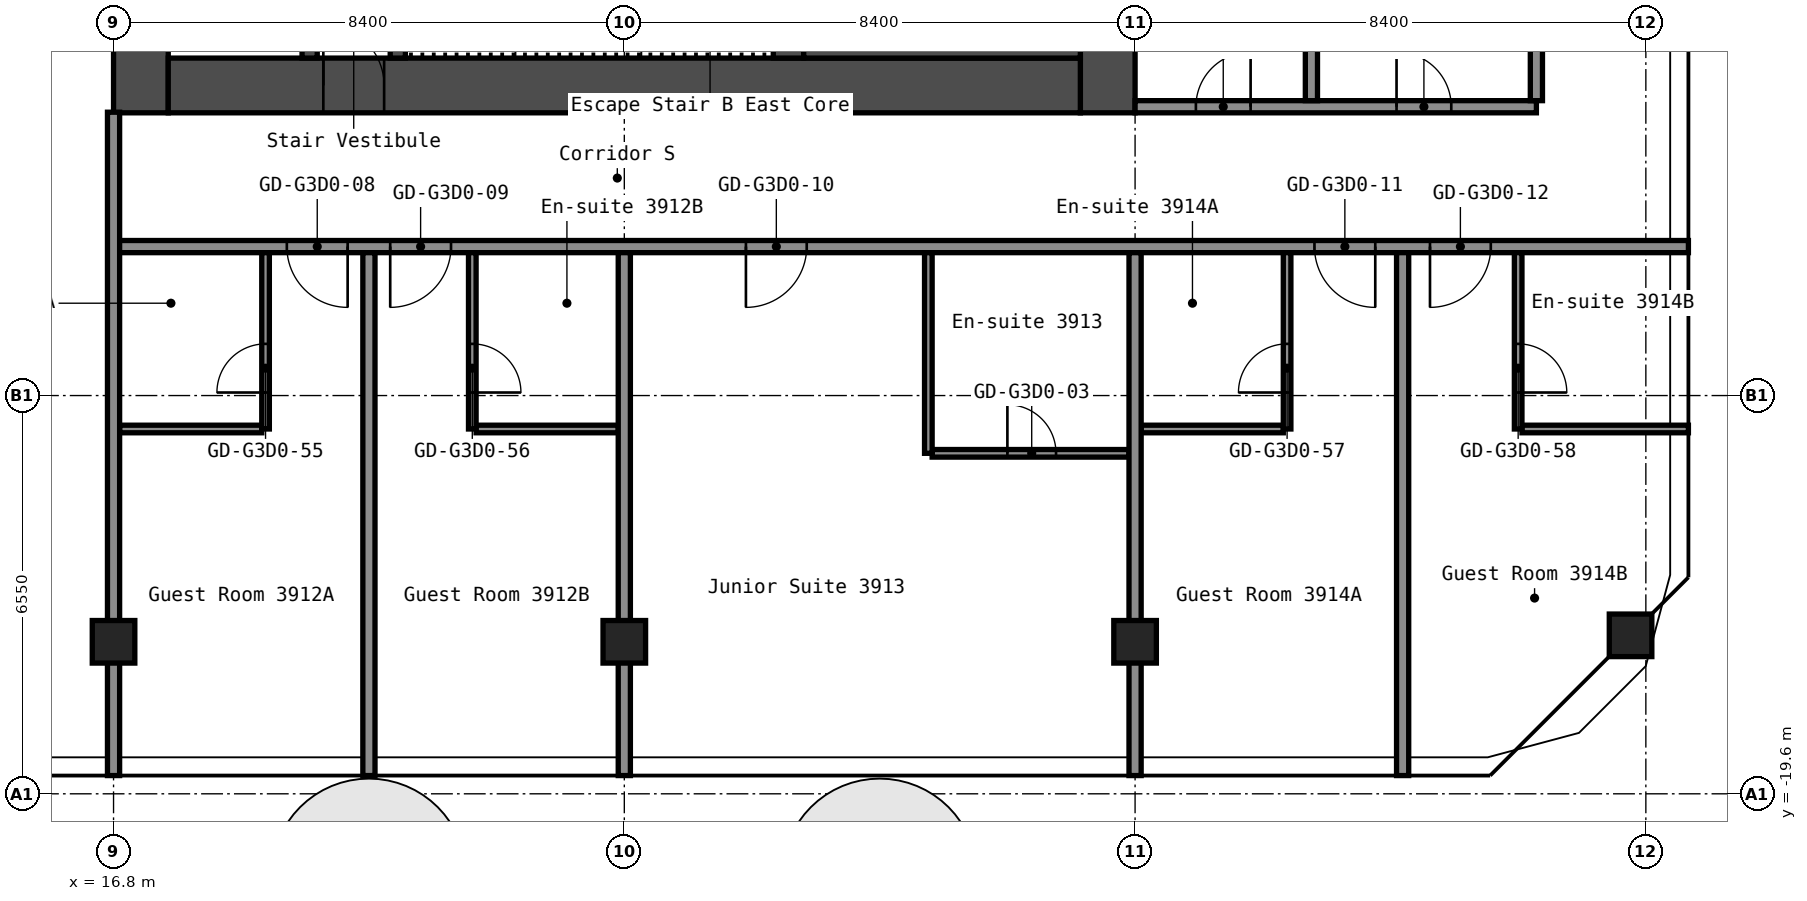
"""IFC4 building model, lengths in metres.
Left out: names, types, materials, properties, quantities, classifications, styles, units other than length and angle.
Written with IfcOpenShell. Run it as: python <this file> out.ifc"""

import sys

from ifc_helpers import new_model, si_unit, direction, frame, frame_2d, origin, origin_2d, place, context, subcontext, project, spatial, rectangle, hollow_rectangle, extrude, element, fill, save


model = new_model("IFC4")
c1 = context("Model", 3, precision=1e-05, world=origin(), true_north=direction((0.0, 1.0)))
c2 = subcontext(c1, "Body", "Model", "MODEL_VIEW")
j1 = project(units=[si_unit("LENGTHUNIT", "METRE"), si_unit("PLANEANGLEUNIT", "RADIAN")], contexts=[c1])
p1 = place(None, origin())
s1 = spatial("IfcSite", under=j1, at=p1, CompositionType="ELEMENT")
p2 = place(p1, origin())
s2 = spatial("IfcBuilding", under=s1, at=p2, CompositionType="ELEMENT")
p3 = place(p2, frame((0.0, 0.0, 140.6)))
s3 = spatial("IfcBuildingStorey", under=s2, at=p3, CompositionType="ELEMENT", Elevation=140.6)
for number, where, z_axis, x_axis in (
    (1, (16.8, -17.1, 0.0), (0.0, 0.0, 1.0), (1.0, 0.0, 0.0)),
    (2, (25.2, -17.1, 0.0), (0.0, 0.0, 1.0), (1.0, 0.0, 0.0)),
    (3, (33.6, -17.1, 0.0), (0.0, 0.0, 1.0), (1.0, 0.0, 0.0)),
    (4, (41.749, -16.994, 0.0), (0.0, 0.0, 1.0), (1.0, 0.0, 0.0)),
):
    element("IfcColumn", number, at=place(p3, frame(where, z_axis=z_axis, x_axis=x_axis)), inside=s3, PredefinedType="COLUMN", context=c2, shape_type="SweptSolid", body=[
        extrude(hollow_rectangle(XDim=0.7, YDim=0.7, WallThickness=0.028, at=origin_2d()), origin(), (0.0, 0.0, 1.0), 2.75),
    ])
p4 = place(p3, frame((17.25, -8.4, 0.0), z_axis=(0.0, 0.0, 1.0), x_axis=(0.0, 1.0, 0.0)))
e5 = element("IfcWall", 5, at=p4, inside=s3, PredefinedType="SHEAR", context=c2, shape_type="SweptSolid", body=[
    extrude(rectangle(XDim=16.8, YDim=0.9, at=frame_2d((8.4, 0.0))), origin(), (0.0, 0.0, 1.0), 2.75),
])
p5 = place(p4, frame((7.1, 0.0, 0.0)))
e6 = element("IfcOpeningElement", 6, at=p5, cuts=e5, PredefinedType="OPENING", context=c2, shape_type="SweptSolid", body=[
    extrude(rectangle(XDim=1.6, YDim=2.1, at=frame_2d((0.8, 1.05))), frame((0.0, 0.46, 0.0), z_axis=(0.0, -1.0, 0.0), x_axis=(1.0, 0.0, 0.0)), (0.0, 0.0, 1.0), 0.92),
])
p6 = place(p3, frame((33.15, -8.4, 0.0), z_axis=(0.0, 0.0, 1.0), x_axis=(0.0, 1.0, 0.0)))
e7 = element("IfcWall", 7, at=p6, inside=s3, PredefinedType="SHEAR", context=c2, shape_type="SweptSolid", body=[
    extrude(rectangle(XDim=16.8, YDim=0.9, at=frame_2d((8.4, 0.0))), origin(), (0.0, 0.0, 1.0), 2.75),
])
p7 = place(p3, frame((17.7, -7.95, 0.0), z_axis=(0.0, 0.0, 1.0), x_axis=(1.0, 0.0, 0.0)))
e8 = element("IfcWall", 8, at=p7, inside=s3, PredefinedType="SHEAR", context=c2, shape_type="SweptSolid", body=[
    extrude(rectangle(XDim=15.0, YDim=0.9, at=frame_2d((7.5, 0.0))), origin(), (0.0, 0.0, 1.0), 2.75),
])
p8 = place(p7, frame((2.55, 0.0, 0.0)))
e9 = element("IfcOpeningElement", 9, at=p8, cuts=e8, PredefinedType="OPENING", context=c2, shape_type="SweptSolid", body=[
    extrude(rectangle(XDim=1.0, YDim=2.1, at=frame_2d((0.5, 1.05))), frame((0.0, 0.46, 0.0), z_axis=(0.0, -1.0, 0.0), x_axis=(1.0, 0.0, 0.0)), (0.0, 0.0, 1.0), 0.92),
])
p9 = place(p3, frame((20.025, -7.5, 0.0), z_axis=(0.0, 0.0, 1.0), x_axis=(0.0, 1.0, 0.0)))
e10 = element("IfcWall", 10, at=p9, inside=s3, PredefinedType="SHEAR", context=c2, shape_type="SweptSolid", body=[
    extrude(rectangle(XDim=6.3, YDim=0.25, at=frame_2d((3.15, 0.0))), origin(), (0.0, 0.0, 1.0), 2.75),
])
p10 = place(p9, frame((2.4, 0.0, 0.0)))
e11 = element("IfcOpeningElement", 11, at=p10, cuts=e10, PredefinedType="OPENING", context=c2, shape_type="SweptSolid", body=[
    extrude(rectangle(XDim=1.0, YDim=2.1, at=frame_2d((0.5, 1.05))), frame((0.0, 0.135, 0.0), z_axis=(0.0, -1.0, 0.0), x_axis=(1.0, 0.0, 0.0)), (0.0, 0.0, 1.0), 0.27),
])
p11 = place(p3, frame((21.475, -7.5, 0.0), z_axis=(0.0, 0.0, 1.0), x_axis=(0.0, 1.0, 0.0)))
e12 = element("IfcWall", 12, at=p11, inside=s3, PredefinedType="SHEAR", context=c2, shape_type="SweptSolid", body=[
    extrude(rectangle(XDim=3.75, YDim=0.25, at=frame_2d((1.875, 0.0))), origin(), (0.0, 0.0, 1.0), 2.75),
])
p12 = place(p11, frame((1.3, 0.0, 0.0)))
e13 = element("IfcOpeningElement", 13, at=p12, cuts=e12, PredefinedType="OPENING", context=c2, shape_type="SweptSolid", body=[
    extrude(rectangle(XDim=1.2, YDim=2.1, at=frame_2d((0.6, 1.05))), frame((0.0, 0.135, 0.0), z_axis=(0.0, -1.0, 0.0), x_axis=(1.0, 0.0, 0.0)), (0.0, 0.0, 1.0), 0.27),
])
p13 = place(p3, frame((27.9, -7.5, 0.0), z_axis=(0.0, 0.0, 1.0), x_axis=(0.0, 1.0, 0.0)))
e14 = element("IfcWall", 14, at=p13, inside=s3, PredefinedType="SHEAR", context=c2, shape_type="SweptSolid", body=[
    extrude(rectangle(XDim=3.75, YDim=0.5, at=frame_2d((1.875, 0.0))), origin(), (0.0, 0.0, 1.0), 2.75),
])
p14 = place(p3, frame((28.15, -6.75, 0.0), z_axis=(0.0, 0.0, 1.0), x_axis=(1.0, 0.0, 0.0)))
e15 = element("IfcWall", 15, at=p14, inside=s3, PredefinedType="SHEAR", context=c2, shape_type="SweptSolid", body=[
    extrude(rectangle(XDim=4.55, YDim=1.5, at=frame_2d((2.275, 0.0))), origin(), (0.0, 0.0, 1.0), 2.75),
])
p15 = place(p3, frame((30.262, -14.0, 0.0), z_axis=(0.0, 0.0, 1.0), x_axis=(1.0, 0.0, 0.0)))
e16 = element("IfcWall", 16, at=p15, inside=s3, PredefinedType="PARTITIONING", context=c2, shape_type="SweptSolid", body=[
    extrude(rectangle(XDim=3.238, YDim=0.125, at=frame_2d((1.619, 0.0))), origin(), (0.0, 0.0, 1.0), 2.75),
])
p16 = place(p15, frame((1.238, 0.0, 0.0)))
e17 = element("IfcOpeningElement", 17, at=p16, cuts=e16, PredefinedType="OPENING", context=c2, shape_type="SweptSolid", body=[
    extrude(rectangle(XDim=0.8, YDim=2.1, at=frame_2d((0.4, 1.05))), frame((0.0, 0.073, 0.0), z_axis=(0.0, -1.0, 0.0), x_axis=(1.0, 0.0, 0.0)), (0.0, 0.0, 1.0), 0.145),
])
for number, where, z_axis, x_axis in (
    (18, (16.9, -13.6, 0.0), (0.0, 0.0, 1.0), (1.0, 0.0, 0.0)),
    (19, (22.762, -13.6, 0.0), (0.0, 0.0, 1.0), (1.0, 0.0, 0.0)),
    (20, (33.7, -13.6, 0.0), (0.0, 0.0, 1.0), (1.0, 0.0, 0.0)),
):
    element("IfcWall", number, at=place(p3, frame(where, z_axis=z_axis, x_axis=x_axis)), inside=s3, PredefinedType="PARTITIONING", context=c2, shape_type="SweptSolid", body=[
        extrude(rectangle(XDim=2.338, YDim=0.125, at=frame_2d((1.169, 0.0))), origin(), (0.0, 0.0, 1.0), 2.75),
    ])
p17 = place(p3, frame((39.962, -13.6, 0.0), z_axis=(0.0, 0.0, 1.0), x_axis=(1.0, 0.0, 0.0)))
e21 = element("IfcWall", 21, at=p17, inside=s3, PredefinedType="PARTITIONING", context=c2, shape_type="SweptSolid", body=[
    extrude(rectangle(XDim=2.738, YDim=0.125, at=frame_2d((1.369, 0.0))), origin(), (0.0, 0.0, 1.0), 2.75),
])
p18 = place(p3, frame((16.8, -10.6, 0.0), z_axis=(0.0, 0.0, 1.0), x_axis=(1.0, 0.0, 0.0)))
e22 = element("IfcWall", 22, at=p18, inside=s3, PredefinedType="PARTITIONING", context=c2, shape_type="SweptSolid", body=[
    extrude(rectangle(XDim=25.9, YDim=0.2, at=frame_2d((12.95, 0.0))), origin(), (0.0, 0.0, 1.0), 2.75),
])
p19 = place(p18, frame((2.85, 0.0, 0.0)))
e23 = element("IfcOpeningElement", 23, at=p19, cuts=e22, PredefinedType="OPENING", context=c2, shape_type="SweptSolid", body=[
    extrude(rectangle(XDim=1.0, YDim=2.1, at=frame_2d((0.5, 1.05))), frame((0.0, 0.11, 0.0), z_axis=(0.0, -1.0, 0.0), x_axis=(1.0, 0.0, 0.0)), (0.0, 0.0, 1.0), 0.22),
])
p20 = place(p18, frame((4.55, 0.0, 0.0)))
e24 = element("IfcOpeningElement", 24, at=p20, cuts=e22, PredefinedType="OPENING", context=c2, shape_type="SweptSolid", body=[
    extrude(rectangle(XDim=1.0, YDim=2.1, at=frame_2d((0.5, 1.05))), frame((0.0, 0.11, 0.0), z_axis=(0.0, -1.0, 0.0), x_axis=(1.0, 0.0, 0.0)), (0.0, 0.0, 1.0), 0.22),
])
p21 = place(p18, frame((10.4, 0.0, 0.0)))
e25 = element("IfcOpeningElement", 25, at=p21, cuts=e22, PredefinedType="OPENING", context=c2, shape_type="SweptSolid", body=[
    extrude(rectangle(XDim=1.0, YDim=2.1, at=frame_2d((0.5, 1.05))), frame((0.0, 0.11, 0.0), z_axis=(0.0, -1.0, 0.0), x_axis=(1.0, 0.0, 0.0)), (0.0, 0.0, 1.0), 0.22),
])
p22 = place(p18, frame((19.75, 0.0, 0.0)))
e26 = element("IfcOpeningElement", 26, at=p22, cuts=e22, PredefinedType="OPENING", context=c2, shape_type="SweptSolid", body=[
    extrude(rectangle(XDim=1.0, YDim=2.1, at=frame_2d((0.5, 1.05))), frame((0.0, 0.11, 0.0), z_axis=(0.0, -1.0, 0.0), x_axis=(1.0, 0.0, 0.0)), (0.0, 0.0, 1.0), 0.22),
])
p23 = place(p18, frame((21.65, 0.0, 0.0)))
e27 = element("IfcOpeningElement", 27, at=p23, cuts=e22, PredefinedType="OPENING", context=c2, shape_type="SweptSolid", body=[
    extrude(rectangle(XDim=1.0, YDim=2.1, at=frame_2d((0.5, 1.05))), frame((0.0, 0.11, 0.0), z_axis=(0.0, -1.0, 0.0), x_axis=(1.0, 0.0, 0.0)), (0.0, 0.0, 1.0), 0.22),
])
p24 = place(p3, frame((33.6, -8.3, 0.0), z_axis=(0.0, 0.0, 1.0), x_axis=(1.0, 0.0, 0.0)))
e28 = element("IfcWall", 28, at=p24, inside=s3, PredefinedType="PARTITIONING", context=c2, shape_type="SweptSolid", body=[
    extrude(rectangle(XDim=6.6, YDim=0.2, at=frame_2d((3.3, 0.0))), origin(), (0.0, 0.0, 1.0), 2.75),
])
p25 = place(p24, frame((1.0, 0.0, 0.0)))
e29 = element("IfcOpeningElement", 29, at=p25, cuts=e28, PredefinedType="OPENING", context=c2, shape_type="SweptSolid", body=[
    extrude(rectangle(XDim=0.9, YDim=2.1, at=frame_2d((0.45, 1.05))), frame((0.0, 0.11, 0.0), z_axis=(0.0, -1.0, 0.0), x_axis=(1.0, 0.0, 0.0)), (0.0, 0.0, 1.0), 0.22),
])
p26 = place(p24, frame((4.3, 0.0, 0.0)))
e30 = element("IfcOpeningElement", 30, at=p26, cuts=e28, PredefinedType="OPENING", context=c2, shape_type="SweptSolid", body=[
    extrude(rectangle(XDim=0.9, YDim=2.1, at=frame_2d((0.45, 1.05))), frame((0.0, 0.11, 0.0), z_axis=(0.0, -1.0, 0.0), x_axis=(1.0, 0.0, 0.0)), (0.0, 0.0, 1.0), 0.22),
])
p27 = place(p3, frame((16.8, -19.3, 0.0), z_axis=(0.0, 0.0, 1.0), x_axis=(0.0, 1.0, 0.0)))
e31 = element("IfcWall", 31, at=p27, inside=s3, PredefinedType="PARTITIONING", context=c2, shape_type="SweptSolid", body=[
    extrude(rectangle(XDim=10.91, YDim=0.2, at=frame_2d((5.455, 0.0))), origin(), (0.0, 0.0, 1.0), 2.75),
])
p28 = place(p3, frame((19.3, -13.6, 0.0), z_axis=(0.0, 0.0, 1.0), x_axis=(0.0, 1.0, 0.0)))
e32 = element("IfcWall", 32, at=p28, inside=s3, PredefinedType="PARTITIONING", context=c2, shape_type="SweptSolid", body=[
    extrude(rectangle(XDim=2.9, YDim=0.125, at=frame_2d((1.45, 0.0))), origin(), (0.0, 0.0, 1.0), 2.75),
])
p29 = place(p28, frame((0.6, 0.0, 0.0)))
e33 = element("IfcOpeningElement", 33, at=p29, cuts=e32, PredefinedType="OPENING", context=c2, shape_type="SweptSolid", body=[
    extrude(rectangle(XDim=0.8, YDim=2.1, at=frame_2d((0.4, 1.05))), frame((0.0, 0.073, 0.0), z_axis=(0.0, -1.0, 0.0), x_axis=(1.0, 0.0, 0.0)), (0.0, 0.0, 1.0), 0.145),
])
p30 = place(p3, frame((21.0, -19.3, 0.0), z_axis=(0.0, 0.0, 1.0), x_axis=(0.0, 1.0, 0.0)))
e34 = element("IfcWall", 34, at=p30, inside=s3, PredefinedType="PARTITIONING", context=c2, shape_type="SweptSolid", body=[
    extrude(rectangle(XDim=8.6, YDim=0.2, at=frame_2d((4.3, 0.0))), origin(), (0.0, 0.0, 1.0), 2.75),
])
p31 = place(p3, frame((22.7, -13.6, 0.0), z_axis=(0.0, 0.0, 1.0), x_axis=(0.0, 1.0, 0.0)))
e35 = element("IfcWall", 35, at=p31, inside=s3, PredefinedType="PARTITIONING", context=c2, shape_type="SweptSolid", body=[
    extrude(rectangle(XDim=2.9, YDim=0.125, at=frame_2d((1.45, 0.0))), origin(), (0.0, 0.0, 1.0), 2.75),
])
p32 = place(p31, frame((0.6, 0.0, 0.0)))
e36 = element("IfcOpeningElement", 36, at=p32, cuts=e35, PredefinedType="OPENING", context=c2, shape_type="SweptSolid", body=[
    extrude(rectangle(XDim=0.8, YDim=2.1, at=frame_2d((0.4, 1.05))), frame((0.0, 0.073, 0.0), z_axis=(0.0, -1.0, 0.0), x_axis=(1.0, 0.0, 0.0)), (0.0, 0.0, 1.0), 0.145),
])
p33 = place(p3, frame((25.2, -19.3, 0.0), z_axis=(0.0, 0.0, 1.0), x_axis=(0.0, 1.0, 0.0)))
e37 = element("IfcWall", 37, at=p33, inside=s3, PredefinedType="PARTITIONING", context=c2, shape_type="SweptSolid", body=[
    extrude(rectangle(XDim=8.6, YDim=0.2, at=frame_2d((4.3, 0.0))), origin(), (0.0, 0.0, 1.0), 2.75),
])
p34 = place(p3, frame((30.2, -14.0, 0.0), z_axis=(0.0, 0.0, 1.0), x_axis=(0.0, 1.0, 0.0)))
e38 = element("IfcWall", 38, at=p34, inside=s3, PredefinedType="PARTITIONING", context=c2, shape_type="SweptSolid", body=[
    extrude(rectangle(XDim=3.3, YDim=0.125, at=frame_2d((1.65, 0.0))), origin(), (0.0, 0.0, 1.0), 2.75),
])
p35 = place(p3, frame((33.6, -19.3, 0.0), z_axis=(0.0, 0.0, 1.0), x_axis=(0.0, 1.0, 0.0)))
e39 = element("IfcWall", 39, at=p35, inside=s3, PredefinedType="PARTITIONING", context=c2, shape_type="SweptSolid", body=[
    extrude(rectangle(XDim=8.6, YDim=0.2, at=frame_2d((4.3, 0.0))), origin(), (0.0, 0.0, 1.0), 2.75),
])
p36 = place(p3, frame((36.1, -13.6, 0.0), z_axis=(0.0, 0.0, 1.0), x_axis=(0.0, 1.0, 0.0)))
e40 = element("IfcWall", 40, at=p36, inside=s3, PredefinedType="PARTITIONING", context=c2, shape_type="SweptSolid", body=[
    extrude(rectangle(XDim=2.9, YDim=0.125, at=frame_2d((1.45, 0.0))), origin(), (0.0, 0.0, 1.0), 2.75),
])
p37 = place(p36, frame((0.6, 0.0, 0.0)))
e41 = element("IfcOpeningElement", 41, at=p37, cuts=e40, PredefinedType="OPENING", context=c2, shape_type="SweptSolid", body=[
    extrude(rectangle(XDim=0.8, YDim=2.1, at=frame_2d((0.4, 1.05))), frame((0.0, 0.073, 0.0), z_axis=(0.0, -1.0, 0.0), x_axis=(1.0, 0.0, 0.0)), (0.0, 0.0, 1.0), 0.145),
])
p38 = place(p3, frame((36.5, -8.2, 0.0), z_axis=(0.0, 0.0, 1.0), x_axis=(0.0, 1.0, 0.0)))
e42 = element("IfcWall", 42, at=p38, inside=s3, PredefinedType="PARTITIONING", context=c2, shape_type="SweptSolid", body=[
    extrude(rectangle(XDim=8.2, YDim=0.2, at=frame_2d((4.1, 0.0))), origin(), (0.0, 0.0, 1.0), 2.75),
])
p39 = place(p3, frame((38.0, -19.3, 0.0), z_axis=(0.0, 0.0, 1.0), x_axis=(0.0, 1.0, 0.0)))
e43 = element("IfcWall", 43, at=p39, inside=s3, PredefinedType="PARTITIONING", context=c2, shape_type="SweptSolid", body=[
    extrude(rectangle(XDim=8.6, YDim=0.2, at=frame_2d((4.3, 0.0))), origin(), (0.0, 0.0, 1.0), 2.75),
])
p40 = place(p3, frame((39.9, -13.6, 0.0), z_axis=(0.0, 0.0, 1.0), x_axis=(0.0, 1.0, 0.0)))
e44 = element("IfcWall", 44, at=p40, inside=s3, PredefinedType="PARTITIONING", context=c2, shape_type="SweptSolid", body=[
    extrude(rectangle(XDim=2.9, YDim=0.125, at=frame_2d((1.45, 0.0))), origin(), (0.0, 0.0, 1.0), 2.75),
])
p41 = place(p40, frame((0.6, 0.0, 0.0)))
e45 = element("IfcOpeningElement", 45, at=p41, cuts=e44, PredefinedType="OPENING", context=c2, shape_type="SweptSolid", body=[
    extrude(rectangle(XDim=0.8, YDim=2.1, at=frame_2d((0.4, 1.05))), frame((0.0, 0.073, 0.0), z_axis=(0.0, -1.0, 0.0), x_axis=(1.0, 0.0, 0.0)), (0.0, 0.0, 1.0), 0.145),
])
p42 = place(p3, frame((40.2, -8.2, 0.0), z_axis=(0.0, 0.0, 1.0), x_axis=(0.0, 1.0, 0.0)))
e46 = element("IfcWall", 46, at=p42, inside=s3, PredefinedType="PARTITIONING", context=c2, shape_type="SweptSolid", body=[
    extrude(rectangle(XDim=16.4, YDim=0.2, at=frame_2d((8.2, 0.0))), origin(), (0.0, 0.0, 1.0), 2.75),
])
p43 = place(p8, origin())
e47 = element("IfcDoor", 47, at=p43, inside=s3, OperationType="SINGLE_SWING_RIGHT", PredefinedType="DOOR", context=c2, shape_type="SweptSolid", body=[
    extrude(rectangle(XDim=1.0, YDim=2.1, at=frame_2d((0.5, 1.05))), frame((0.0, 0.025, 0.0), z_axis=(0.0, -1.0, 0.0), x_axis=(1.0, 0.0, 0.0)), (0.0, 0.0, 1.0), 0.05),
])
fill(e9, e47)
p44 = place(p16, origin())
e48 = element("IfcDoor", 48, at=p44, inside=s3, OperationType="SINGLE_SWING_RIGHT", PredefinedType="DOOR", context=c2, shape_type="SweptSolid", body=[
    extrude(rectangle(XDim=0.8, YDim=2.1, at=frame_2d((0.4, 1.05))), frame((0.0, 0.025, 0.0), z_axis=(0.0, -1.0, 0.0), x_axis=(1.0, 0.0, 0.0)), (0.0, 0.0, 1.0), 0.05),
])
fill(e17, e48)
p45 = place(p19, origin())
e49 = element("IfcDoor", 49, at=p45, inside=s3, OperationType="SINGLE_SWING_RIGHT", PredefinedType="DOOR", context=c2, shape_type="SweptSolid", body=[
    extrude(rectangle(XDim=1.0, YDim=2.1, at=frame_2d((0.5, 1.05))), frame((0.0, 0.025, 0.0), z_axis=(0.0, -1.0, 0.0), x_axis=(1.0, 0.0, 0.0)), (0.0, 0.0, 1.0), 0.05),
])
fill(e23, e49)
p46 = place(p20, origin())
e50 = element("IfcDoor", 50, at=p46, inside=s3, OperationType="SINGLE_SWING_LEFT", PredefinedType="DOOR", context=c2, shape_type="SweptSolid", body=[
    extrude(rectangle(XDim=1.0, YDim=2.1, at=frame_2d((0.5, 1.05))), frame((0.0, 0.025, 0.0), z_axis=(0.0, -1.0, 0.0), x_axis=(1.0, 0.0, 0.0)), (0.0, 0.0, 1.0), 0.05),
])
fill(e24, e50)
p47 = place(p21, origin())
e51 = element("IfcDoor", 51, at=p47, inside=s3, OperationType="SINGLE_SWING_LEFT", PredefinedType="DOOR", context=c2, shape_type="SweptSolid", body=[
    extrude(rectangle(XDim=1.0, YDim=2.1, at=frame_2d((0.5, 1.05))), frame((0.0, 0.025, 0.0), z_axis=(0.0, -1.0, 0.0), x_axis=(1.0, 0.0, 0.0)), (0.0, 0.0, 1.0), 0.05),
])
fill(e25, e51)
p48 = place(p22, origin())
e52 = element("IfcDoor", 52, at=p48, inside=s3, OperationType="SINGLE_SWING_RIGHT", PredefinedType="DOOR", context=c2, shape_type="SweptSolid", body=[
    extrude(rectangle(XDim=1.0, YDim=2.1, at=frame_2d((0.5, 1.05))), frame((0.0, 0.025, 0.0), z_axis=(0.0, -1.0, 0.0), x_axis=(1.0, 0.0, 0.0)), (0.0, 0.0, 1.0), 0.05),
])
fill(e26, e52)
p49 = place(p23, origin())
e53 = element("IfcDoor", 53, at=p49, inside=s3, OperationType="SINGLE_SWING_LEFT", PredefinedType="DOOR", context=c2, shape_type="SweptSolid", body=[
    extrude(rectangle(XDim=1.0, YDim=2.1, at=frame_2d((0.5, 1.05))), frame((0.0, 0.025, 0.0), z_axis=(0.0, -1.0, 0.0), x_axis=(1.0, 0.0, 0.0)), (0.0, 0.0, 1.0), 0.05),
])
fill(e27, e53)
p50 = place(p25, origin())
e54 = element("IfcDoor", 54, at=p50, inside=s3, OperationType="SINGLE_SWING_LEFT", PredefinedType="DOOR", context=c2, shape_type="SweptSolid", body=[
    extrude(rectangle(XDim=0.9, YDim=2.1, at=frame_2d((0.45, 1.05))), frame((0.0, 0.025, 0.0), z_axis=(0.0, -1.0, 0.0), x_axis=(1.0, 0.0, 0.0)), (0.0, 0.0, 1.0), 0.05),
])
fill(e29, e54)
p51 = place(p26, origin())
e55 = element("IfcDoor", 55, at=p51, inside=s3, OperationType="SINGLE_SWING_RIGHT", PredefinedType="DOOR", context=c2, shape_type="SweptSolid", body=[
    extrude(rectangle(XDim=0.9, YDim=2.1, at=frame_2d((0.45, 1.05))), frame((0.0, 0.025, 0.0), z_axis=(0.0, -1.0, 0.0), x_axis=(1.0, 0.0, 0.0)), (0.0, 0.0, 1.0), 0.05),
])
fill(e30, e55)
p52 = place(p29, origin())
e56 = element("IfcDoor", 56, at=p52, inside=s3, OperationType="SINGLE_SWING_RIGHT", PredefinedType="DOOR", context=c2, shape_type="SweptSolid", body=[
    extrude(rectangle(XDim=0.8, YDim=2.1, at=frame_2d((0.4, 1.05))), frame((0.0, 0.025, 0.0), z_axis=(0.0, -1.0, 0.0), x_axis=(1.0, 0.0, 0.0)), (0.0, 0.0, 1.0), 0.05),
])
fill(e33, e56)
p53 = place(p32, origin())
e57 = element("IfcDoor", 57, at=p53, inside=s3, OperationType="SINGLE_SWING_LEFT", PredefinedType="DOOR", context=c2, shape_type="SweptSolid", body=[
    extrude(rectangle(XDim=0.8, YDim=2.1, at=frame_2d((0.4, 1.05))), frame((0.0, 0.025, 0.0), z_axis=(0.0, -1.0, 0.0), x_axis=(1.0, 0.0, 0.0)), (0.0, 0.0, 1.0), 0.05),
])
fill(e36, e57)
p54 = place(p37, origin())
e58 = element("IfcDoor", 58, at=p54, inside=s3, OperationType="SINGLE_SWING_RIGHT", PredefinedType="DOOR", context=c2, shape_type="SweptSolid", body=[
    extrude(rectangle(XDim=0.8, YDim=2.1, at=frame_2d((0.4, 1.05))), frame((0.0, 0.025, 0.0), z_axis=(0.0, -1.0, 0.0), x_axis=(1.0, 0.0, 0.0)), (0.0, 0.0, 1.0), 0.05),
])
fill(e41, e58)
p55 = place(p41, origin())
e59 = element("IfcDoor", 59, at=p55, inside=s3, OperationType="SINGLE_SWING_LEFT", PredefinedType="DOOR", context=c2, shape_type="SweptSolid", body=[
    extrude(rectangle(XDim=0.8, YDim=2.1, at=frame_2d((0.4, 1.05))), frame((0.0, 0.025, 0.0), z_axis=(0.0, -1.0, 0.0), x_axis=(1.0, 0.0, 0.0)), (0.0, 0.0, 1.0), 0.05),
])
fill(e45, e59)
save(model, sys.argv[1])
